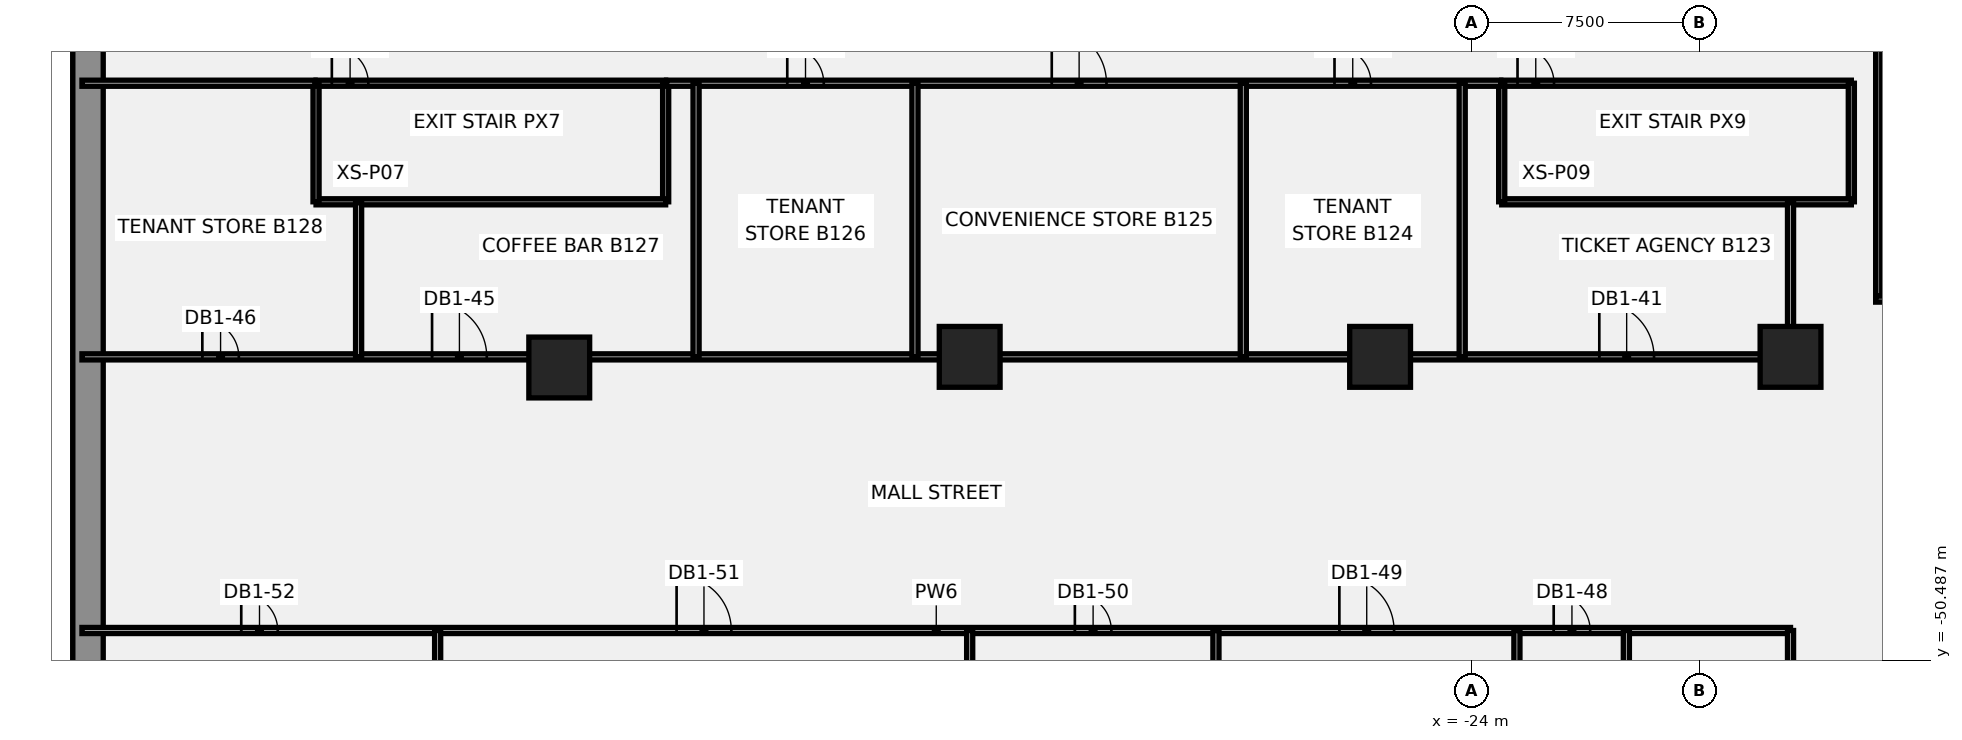
"""IFC4 building model, lengths in metres.
Left out: names, types, materials, properties, quantities, classifications, styles, units other than length and angle.
Written with IfcOpenShell. Run it as: python <this file> out.ifc"""

import sys

from ifc_helpers import new_model, si_unit, direction, frame, frame_2d, origin, origin_2d, place, context, subcontext, project, spatial, rectangle, extrude, element, fill, save


model = new_model("IFC4")
c1 = context("Model", 3, precision=1e-05, world=origin(), true_north=direction((0.0, 1.0)))
c2 = subcontext(c1, "Body", "Model", "MODEL_VIEW")
j1 = project(units=[si_unit("LENGTHUNIT", "METRE"), si_unit("PLANEANGLEUNIT", "RADIAN")], contexts=[c1])
p1 = place(None, origin())
s1 = spatial("IfcSite", under=j1, at=p1, CompositionType="ELEMENT")
p2 = place(p1, origin())
s2 = spatial("IfcBuilding", under=s1, at=p2, CompositionType="ELEMENT")
p3 = place(p2, frame((0.0, 0.0, -7.0)))
s3 = spatial("IfcBuildingStorey", under=s2, at=p3, CompositionType="ELEMENT", Elevation=-7.0)
p4 = place(p3, frame((-69.5, -53.931, -0.45), z_axis=(0.0, 0.0, 1.0), x_axis=(0.0, 1.0, 0.0)))
e1 = element("IfcWall", 1, at=p4, inside=s3, PredefinedType="SOLIDWALL", context=c2, shape_type="SweptSolid", body=[
    extrude(rectangle(XDim=107.863, YDim=1.0, at=frame_2d((53.931, 0.0))), origin(), (0.0, 0.0, 1.0), 6.9),
])
for number, where, z_axis, x_axis in (
    (2, (-54.0, -40.85, -0.45), (0.0, 0.0, 1.0), (1.0, 0.0, 0.0)),
    (3, (-40.5, -40.5, -0.45), (0.0, 0.0, 1.0), (1.0, 0.0, 0.0)),
    (4, (-27.0, -40.5, -0.45), (0.0, 0.0, 1.0), (1.0, 0.0, 0.0)),
    (5, (-13.5, -40.5, -0.45), (0.0, 0.0, 1.0), (1.0, 0.0, 0.0)),
):
    element("IfcColumn", number, at=place(p3, frame(where, z_axis=z_axis, x_axis=x_axis)), inside=s3, PredefinedType="COLUMN", context=c2, shape_type="SweptSolid", body=[
        extrude(rectangle(XDim=2.0, YDim=2.0, at=origin_2d()), origin(), (0.0, 0.0, 1.0), 6.9),
    ])
p5 = place(p3, frame((-62.0, -31.5, 0.0), z_axis=(0.0, 0.0, 1.0), x_axis=(1.0, 0.0, 0.0)))
e6 = element("IfcWall", 6, at=p5, inside=s3, PredefinedType="PARTITIONING", context=c2, shape_type="SweptSolid", body=[
    extrude(rectangle(XDim=11.5, YDim=0.2, at=frame_2d((5.75, 0.0))), origin(), (0.0, 0.0, 1.0), 6.45),
])
p6 = place(p5, frame((0.52, 0.0, 0.0)))
e7 = element("IfcOpeningElement", 7, at=p6, cuts=e6, PredefinedType="OPENING", context=c2, shape_type="SweptSolid", body=[
    extrude(rectangle(XDim=1.2, YDim=2.1, at=frame_2d((0.6, 1.05))), frame((0.0, 0.11, 0.0), z_axis=(0.0, -1.0, 0.0), x_axis=(1.0, 0.0, 0.0)), (0.0, 0.0, 1.0), 0.22),
])
p7 = place(p3, frame((-50.5, -35.4, 0.0), z_axis=(0.0, 0.0, 1.0), x_axis=(0.0, 1.0, 0.0)))
e8 = element("IfcWall", 8, at=p7, inside=s3, PredefinedType="PARTITIONING", context=c2, shape_type="SweptSolid", body=[
    extrude(rectangle(XDim=3.9, YDim=0.2, at=frame_2d((1.95, 0.0))), origin(), (0.0, 0.0, 1.0), 6.45),
])
p8 = place(p3, frame((-62.0, -35.4, 0.0), z_axis=(0.0, 0.0, 1.0), x_axis=(1.0, 0.0, 0.0)))
e9 = element("IfcWall", 9, at=p8, inside=s3, PredefinedType="PARTITIONING", context=c2, shape_type="SweptSolid", body=[
    extrude(rectangle(XDim=11.5, YDim=0.2, at=frame_2d((5.75, 0.0))), origin(), (0.0, 0.0, 1.0), 6.45),
])
p9 = place(p3, frame((-62.0, -35.4, 0.0), z_axis=(0.0, 0.0, 1.0), x_axis=(0.0, 1.0, 0.0)))
e10 = element("IfcWall", 10, at=p9, inside=s3, PredefinedType="PARTITIONING", context=c2, shape_type="SweptSolid", body=[
    extrude(rectangle(XDim=3.9, YDim=0.2, at=frame_2d((1.95, 0.0))), origin(), (0.0, 0.0, 1.0), 6.45),
])
p10 = place(p3, frame((-23.0, -31.5, 0.0), z_axis=(0.0, 0.0, 1.0), x_axis=(1.0, 0.0, 0.0)))
e11 = element("IfcWall", 11, at=p10, inside=s3, PredefinedType="PARTITIONING", context=c2, shape_type="SweptSolid", body=[
    extrude(rectangle(XDim=11.5, YDim=0.2, at=frame_2d((5.75, 0.0))), origin(), (0.0, 0.0, 1.0), 6.45),
])
p11 = place(p10, frame((0.52, 0.0, 0.0)))
e12 = element("IfcOpeningElement", 12, at=p11, cuts=e11, PredefinedType="OPENING", context=c2, shape_type="SweptSolid", body=[
    extrude(rectangle(XDim=1.2, YDim=2.1, at=frame_2d((0.6, 1.05))), frame((0.0, 0.11, 0.0), z_axis=(0.0, -1.0, 0.0), x_axis=(1.0, 0.0, 0.0)), (0.0, 0.0, 1.0), 0.22),
])
p12 = place(p3, frame((-11.5, -35.4, 0.0), z_axis=(0.0, 0.0, 1.0), x_axis=(0.0, 1.0, 0.0)))
e13 = element("IfcWall", 13, at=p12, inside=s3, PredefinedType="PARTITIONING", context=c2, shape_type="SweptSolid", body=[
    extrude(rectangle(XDim=3.9, YDim=0.2, at=frame_2d((1.95, 0.0))), origin(), (0.0, 0.0, 1.0), 6.45),
])
p13 = place(p3, frame((-23.0, -35.4, 0.0), z_axis=(0.0, 0.0, 1.0), x_axis=(1.0, 0.0, 0.0)))
e14 = element("IfcWall", 14, at=p13, inside=s3, PredefinedType="PARTITIONING", context=c2, shape_type="SweptSolid", body=[
    extrude(rectangle(XDim=11.5, YDim=0.2, at=frame_2d((5.75, 0.0))), origin(), (0.0, 0.0, 1.0), 6.45),
])
p14 = place(p3, frame((-23.0, -35.4, 0.0), z_axis=(0.0, 0.0, 1.0), x_axis=(0.0, 1.0, 0.0)))
e15 = element("IfcWall", 15, at=p14, inside=s3, PredefinedType="PARTITIONING", context=c2, shape_type="SweptSolid", body=[
    extrude(rectangle(XDim=3.9, YDim=0.2, at=frame_2d((1.95, 0.0))), origin(), (0.0, 0.0, 1.0), 6.45),
])
p15 = place(p3, frame((-69.699, -49.5, 0.0), z_axis=(0.0, 0.0, 1.0), x_axis=(1.0, 0.0, 0.0)))
e16 = element("IfcWall", 16, at=p15, inside=s3, PredefinedType="PARTITIONING", context=c2, shape_type="SweptSolid", body=[
    extrude(rectangle(XDim=56.199, YDim=0.2, at=frame_2d((28.1, 0.0))), origin(), (0.0, 0.0, 1.0), 6.45),
])
p16 = place(p15, frame((48.409, 0.0, 0.0)))
e17 = element("IfcOpeningElement", 17, at=p16, cuts=e16, PredefinedType="OPENING", context=c2, shape_type="SweptSolid", body=[
    extrude(rectangle(XDim=1.2, YDim=2.1, at=frame_2d((0.6, 1.05))), frame((0.0, 0.11, 0.0), z_axis=(0.0, -1.0, 0.0), x_axis=(1.0, 0.0, 0.0)), (0.0, 0.0, 1.0), 0.22),
])
p17 = place(p15, frame((41.359, 0.0, 0.0)))
e18 = element("IfcOpeningElement", 18, at=p17, cuts=e16, PredefinedType="OPENING", context=c2, shape_type="SweptSolid", body=[
    extrude(rectangle(XDim=1.8, YDim=2.1, at=frame_2d((0.9, 1.05))), frame((0.0, 0.11, 0.0), z_axis=(0.0, -1.0, 0.0), x_axis=(1.0, 0.0, 0.0)), (0.0, 0.0, 1.0), 0.22),
])
p18 = place(p15, frame((32.659, 0.0, 0.0)))
e19 = element("IfcOpeningElement", 19, at=p18, cuts=e16, PredefinedType="OPENING", context=c2, shape_type="SweptSolid", body=[
    extrude(rectangle(XDim=1.2, YDim=2.1, at=frame_2d((0.6, 1.05))), frame((0.0, 0.11, 0.0), z_axis=(0.0, -1.0, 0.0), x_axis=(1.0, 0.0, 0.0)), (0.0, 0.0, 1.0), 0.22),
])
p19 = place(p15, frame((19.559, 0.0, 0.0)))
e20 = element("IfcOpeningElement", 20, at=p19, cuts=e16, PredefinedType="OPENING", context=c2, shape_type="SweptSolid", body=[
    extrude(rectangle(XDim=1.8, YDim=2.1, at=frame_2d((0.9, 1.05))), frame((0.0, 0.11, 0.0), z_axis=(0.0, -1.0, 0.0), x_axis=(1.0, 0.0, 0.0)), (0.0, 0.0, 1.0), 0.22),
])
p20 = place(p15, frame((5.239, 0.0, 0.0)))
e21 = element("IfcOpeningElement", 21, at=p20, cuts=e16, PredefinedType="OPENING", context=c2, shape_type="SweptSolid", body=[
    extrude(rectangle(XDim=1.2, YDim=2.1, at=frame_2d((0.6, 1.05))), frame((0.0, 0.11, 0.0), z_axis=(0.0, -1.0, 0.0), x_axis=(1.0, 0.0, 0.0)), (0.0, 0.0, 1.0), 0.22),
])
p21 = place(p3, frame((-69.699, -40.5, 0.0), z_axis=(0.0, 0.0, 1.0), x_axis=(1.0, 0.0, 0.0)))
e22 = element("IfcWall", 22, at=p21, inside=s3, PredefinedType="PARTITIONING", context=c2, shape_type="SweptSolid", body=[
    extrude(rectangle(XDim=56.199, YDim=0.2, at=frame_2d((28.1, 0.0))), origin(), (0.0, 0.0, 1.0), 6.45),
])
p22 = place(p21, frame((49.909, 0.0, 0.0)))
e23 = element("IfcOpeningElement", 23, at=p22, cuts=e22, PredefinedType="OPENING", context=c2, shape_type="SweptSolid", body=[
    extrude(rectangle(XDim=1.8, YDim=2.1, at=frame_2d((0.9, 1.05))), frame((0.0, 0.11, 0.0), z_axis=(0.0, -1.0, 0.0), x_axis=(1.0, 0.0, 0.0)), (0.0, 0.0, 1.0), 0.22),
])
p23 = place(p21, frame((11.515, 0.0, 0.0)))
e24 = element("IfcOpeningElement", 24, at=p23, cuts=e22, PredefinedType="OPENING", context=c2, shape_type="SweptSolid", body=[
    extrude(rectangle(XDim=1.8, YDim=2.1, at=frame_2d((0.9, 1.05))), frame((0.0, 0.11, 0.0), z_axis=(0.0, -1.0, 0.0), x_axis=(1.0, 0.0, 0.0)), (0.0, 0.0, 1.0), 0.22),
])
p24 = place(p21, frame((3.959, 0.0, 0.0)))
e25 = element("IfcOpeningElement", 25, at=p24, cuts=e22, PredefinedType="OPENING", context=c2, shape_type="SweptSolid", body=[
    extrude(rectangle(XDim=1.2, YDim=2.1, at=frame_2d((0.6, 1.05))), frame((0.0, 0.11, 0.0), z_axis=(0.0, -1.0, 0.0), x_axis=(1.0, 0.0, 0.0)), (0.0, 0.0, 1.0), 0.22),
])
p25 = place(p3, frame((-69.699, -31.5, 0.0), z_axis=(0.0, 0.0, 1.0), x_axis=(1.0, 0.0, 0.0)))
e26 = element("IfcWall", 26, at=p25, inside=s3, PredefinedType="PARTITIONING", context=c2, shape_type="SweptSolid", body=[
    extrude(rectangle(XDim=7.669, YDim=0.2, at=frame_2d((3.834, 0.0))), origin(), (0.0, 0.0, 1.0), 6.45),
])
p26 = place(p3, frame((-60.6, -40.5, 0.0), z_axis=(0.0, 0.0, 1.0), x_axis=(0.0, 1.0, 0.0)))
e27 = element("IfcWall", 27, at=p26, inside=s3, PredefinedType="PARTITIONING", context=c2, shape_type="SweptSolid", body=[
    extrude(rectangle(XDim=5.07, YDim=0.2, at=frame_2d((2.535, 0.0))), origin(), (0.0, 0.0, 1.0), 6.45),
])
p27 = place(p3, frame((-58.0, -59.699, 0.0), z_axis=(0.0, 0.0, 1.0), x_axis=(0.0, 1.0, 0.0)))
e28 = element("IfcWall", 28, at=p27, inside=s3, PredefinedType="PARTITIONING", context=c2, shape_type="SweptSolid", body=[
    extrude(rectangle(XDim=10.199, YDim=0.2, at=frame_2d((5.1, 0.0))), origin(), (0.0, 0.0, 1.0), 6.45),
])
p28 = place(p3, frame((-50.47, -31.5, 0.0), z_axis=(0.0, 0.0, 1.0), x_axis=(1.0, 0.0, 0.0)))
e29 = element("IfcWall", 29, at=p28, inside=s3, PredefinedType="PARTITIONING", context=c2, shape_type="SweptSolid", body=[
    extrude(rectangle(XDim=27.44, YDim=0.2, at=frame_2d((13.72, 0.0))), origin(), (0.0, 0.0, 1.0), 6.45),
])
p29 = place(p28, frame((21.97, 0.0, 0.0)))
e30 = element("IfcOpeningElement", 30, at=p29, cuts=e29, PredefinedType="OPENING", context=c2, shape_type="SweptSolid", body=[
    extrude(rectangle(XDim=1.2, YDim=2.1, at=frame_2d((0.6, 1.05))), frame((0.0, 0.11, 0.0), z_axis=(0.0, -1.0, 0.0), x_axis=(1.0, 0.0, 0.0)), (0.0, 0.0, 1.0), 0.22),
])
p30 = place(p28, frame((12.67, 0.0, 0.0)))
e31 = element("IfcOpeningElement", 31, at=p30, cuts=e29, PredefinedType="OPENING", context=c2, shape_type="SweptSolid", body=[
    extrude(rectangle(XDim=1.8, YDim=2.1, at=frame_2d((0.9, 1.05))), frame((0.0, 0.11, 0.0), z_axis=(0.0, -1.0, 0.0), x_axis=(1.0, 0.0, 0.0)), (0.0, 0.0, 1.0), 0.22),
])
p31 = place(p28, frame((3.97, 0.0, 0.0)))
e32 = element("IfcOpeningElement", 32, at=p31, cuts=e29, PredefinedType="OPENING", context=c2, shape_type="SweptSolid", body=[
    extrude(rectangle(XDim=1.2, YDim=2.1, at=frame_2d((0.6, 1.05))), frame((0.0, 0.11, 0.0), z_axis=(0.0, -1.0, 0.0), x_axis=(1.0, 0.0, 0.0)), (0.0, 0.0, 1.0), 0.22),
])
for number, where, z_axis, x_axis in (
    (33, (-49.5, -40.5, 0.0), (0.0, 0.0, 1.0), (0.0, 1.0, 0.0)),
    (34, (-42.3, -40.5, 0.0), (0.0, 0.0, 1.0), (0.0, 1.0, 0.0)),
):
    element("IfcWall", number, at=place(p3, frame(where, z_axis=z_axis, x_axis=x_axis)), inside=s3, PredefinedType="PARTITIONING", context=c2, shape_type="SweptSolid", body=[
        extrude(rectangle(XDim=9.0, YDim=0.2, at=frame_2d((4.5, 0.0))), origin(), (0.0, 0.0, 1.0), 6.45),
    ])
for number, where, z_axis, x_axis in (
    (35, (-40.5, -59.699, 0.0), (0.0, 0.0, 1.0), (0.0, 1.0, 0.0)),
    (36, (-32.4, -59.699, 0.0), (0.0, 0.0, 1.0), (0.0, 1.0, 0.0)),
):
    element("IfcWall", number, at=place(p3, frame(where, z_axis=z_axis, x_axis=x_axis)), inside=s3, PredefinedType="PARTITIONING", context=c2, shape_type="SweptSolid", body=[
        extrude(rectangle(XDim=10.199, YDim=0.2, at=frame_2d((5.1, 0.0))), origin(), (0.0, 0.0, 1.0), 6.45),
    ])
p32 = place(p3, frame((-31.5, -40.5, 0.0), z_axis=(0.0, 0.0, 1.0), x_axis=(0.0, 1.0, 0.0)))
e37 = element("IfcWall", 37, at=p32, inside=s3, PredefinedType="PARTITIONING", context=c2, shape_type="SweptSolid", body=[
    extrude(rectangle(XDim=9.0, YDim=0.2, at=frame_2d((4.5, 0.0))), origin(), (0.0, 0.0, 1.0), 6.45),
])
p33 = place(p3, frame((-13.5, -40.5, 0.0), z_axis=(0.0, 0.0, 1.0), x_axis=(0.0, 1.0, 0.0)))
e38 = element("IfcWall", 38, at=p33, inside=s3, PredefinedType="PARTITIONING", context=c2, shape_type="SweptSolid", body=[
    extrude(rectangle(XDim=5.07, YDim=0.2, at=frame_2d((2.535, 0.0))), origin(), (0.0, 0.0, 1.0), 6.45),
])
p34 = place(p3, frame((-24.3, -40.5, 0.0), z_axis=(0.0, 0.0, 1.0), x_axis=(0.0, 1.0, 0.0)))
e39 = element("IfcWall", 39, at=p34, inside=s3, PredefinedType="PARTITIONING", context=c2, shape_type="SweptSolid", body=[
    extrude(rectangle(XDim=9.0, YDim=0.2, at=frame_2d((4.5, 0.0))), origin(), (0.0, 0.0, 1.0), 6.45),
])
for number, where, z_axis, x_axis in (
    (40, (-22.5, -59.699, 0.0), (0.0, 0.0, 1.0), (0.0, 1.0, 0.0)),
    (41, (-18.9, -59.699, 0.0), (0.0, 0.0, 1.0), (0.0, 1.0, 0.0)),
):
    element("IfcWall", number, at=place(p3, frame(where, z_axis=z_axis, x_axis=x_axis)), inside=s3, PredefinedType="PARTITIONING", context=c2, shape_type="SweptSolid", body=[
        extrude(rectangle(XDim=10.199, YDim=0.2, at=frame_2d((5.1, 0.0))), origin(), (0.0, 0.0, 1.0), 6.45),
    ])
p35 = place(p3, frame((-13.5, -59.699, 0.0), z_axis=(0.0, 0.0, 1.0), x_axis=(0.0, 1.0, 0.0)))
e42 = element("IfcWall", 42, at=p35, inside=s3, PredefinedType="PARTITIONING", context=c2, shape_type="SweptSolid", body=[
    extrude(rectangle(XDim=10.199, YDim=0.2, at=frame_2d((5.1, 0.0))), origin(), (0.0, 0.0, 1.0), 6.45),
])
p36 = place(p35, frame((2.151, 0.0, 0.0)))
e43 = element("IfcOpeningElement", 43, at=p36, cuts=e42, PredefinedType="OPENING", context=c2, shape_type="SweptSolid", body=[
    extrude(rectangle(XDim=1.8, YDim=2.1, at=frame_2d((0.9, 1.05))), frame((0.0, 0.11, 0.0), z_axis=(0.0, -1.0, 0.0), x_axis=(1.0, 0.0, 0.0)), (0.0, 0.0, 1.0), 0.22),
])
p37 = place(p3, frame((-10.6, -28.8, 0.0), z_axis=(0.0, 0.0, 1.0), x_axis=(0.0, -1.0, 0.0)))
e44 = element("IfcWall", 44, at=p37, inside=s3, PredefinedType="SOLIDWALL", context=c2, shape_type="SweptSolid", body=[
    extrude(rectangle(XDim=9.7, YDim=0.2, at=frame_2d((4.85, 0.0))), origin(), (0.0, 0.0, 1.0), 6.45),
])
p38 = place(p3, frame((-10.7, -38.6, 0.0), z_axis=(0.0, 0.0, 1.0), x_axis=(1.0, 0.0, 0.0)))
e45 = element("IfcWall", 45, at=p38, inside=s3, PredefinedType="SOLIDWALL", context=c2, shape_type="SweptSolid", body=[
    extrude(rectangle(XDim=4.3, YDim=0.2, at=frame_2d((2.15, 0.0))), origin(), (0.0, 0.0, 1.0), 6.45),
])
p39 = place(p6, origin())
e46 = element("IfcDoor", 46, at=p39, inside=s3, OperationType="SINGLE_SWING_LEFT", PredefinedType="DOOR", context=c2, shape_type="SweptSolid", body=[
    extrude(rectangle(XDim=1.2, YDim=2.1, at=frame_2d((0.6, 1.05))), frame((0.0, 0.025, 0.0), z_axis=(0.0, -1.0, 0.0), x_axis=(1.0, 0.0, 0.0)), (0.0, 0.0, 1.0), 0.05),
])
fill(e7, e46)
p40 = place(p11, origin())
e47 = element("IfcDoor", 47, at=p40, inside=s3, OperationType="SINGLE_SWING_LEFT", PredefinedType="DOOR", context=c2, shape_type="SweptSolid", body=[
    extrude(rectangle(XDim=1.2, YDim=2.1, at=frame_2d((0.6, 1.05))), frame((0.0, 0.025, 0.0), z_axis=(0.0, -1.0, 0.0), x_axis=(1.0, 0.0, 0.0)), (0.0, 0.0, 1.0), 0.05),
])
fill(e12, e47)
p41 = place(p22, origin())
e48 = element("IfcDoor", 48, at=p41, inside=s3, OperationType="SINGLE_SWING_LEFT", PredefinedType="DOOR", context=c2, shape_type="SweptSolid", body=[
    extrude(rectangle(XDim=1.8, YDim=2.1, at=frame_2d((0.9, 1.05))), frame((0.0, 0.025, 0.0), z_axis=(0.0, -1.0, 0.0), x_axis=(1.0, 0.0, 0.0)), (0.0, 0.0, 1.0), 0.05),
])
fill(e23, e48)
p42 = place(p29, origin())
e49 = element("IfcDoor", 49, at=p42, inside=s3, OperationType="SINGLE_SWING_RIGHT", PredefinedType="DOOR", context=c2, shape_type="SweptSolid", body=[
    extrude(rectangle(XDim=1.2, YDim=2.1, at=frame_2d((0.6, 1.05))), frame((0.0, 0.025, 0.0), z_axis=(0.0, -1.0, 0.0), x_axis=(1.0, 0.0, 0.0)), (0.0, 0.0, 1.0), 0.05),
])
fill(e30, e49)
p43 = place(p30, origin())
e50 = element("IfcDoor", 50, at=p43, inside=s3, OperationType="SINGLE_SWING_LEFT", PredefinedType="DOOR", context=c2, shape_type="SweptSolid", body=[
    extrude(rectangle(XDim=1.8, YDim=2.1, at=frame_2d((0.9, 1.05))), frame((0.0, 0.025, 0.0), z_axis=(0.0, -1.0, 0.0), x_axis=(1.0, 0.0, 0.0)), (0.0, 0.0, 1.0), 0.05),
])
fill(e31, e50)
p44 = place(p31, origin())
e51 = element("IfcDoor", 51, at=p44, inside=s3, OperationType="SINGLE_SWING_RIGHT", PredefinedType="DOOR", context=c2, shape_type="SweptSolid", body=[
    extrude(rectangle(XDim=1.2, YDim=2.1, at=frame_2d((0.6, 1.05))), frame((0.0, 0.025, 0.0), z_axis=(0.0, -1.0, 0.0), x_axis=(1.0, 0.0, 0.0)), (0.0, 0.0, 1.0), 0.05),
])
fill(e32, e51)
p45 = place(p23, origin())
e52 = element("IfcDoor", 52, at=p45, inside=s3, OperationType="SINGLE_SWING_LEFT", PredefinedType="DOOR", context=c2, shape_type="SweptSolid", body=[
    extrude(rectangle(XDim=1.8, YDim=2.1, at=frame_2d((0.9, 1.05))), frame((0.0, 0.025, 0.0), z_axis=(0.0, -1.0, 0.0), x_axis=(1.0, 0.0, 0.0)), (0.0, 0.0, 1.0), 0.05),
])
fill(e24, e52)
p46 = place(p24, origin())
e53 = element("IfcDoor", 53, at=p46, inside=s3, OperationType="SINGLE_SWING_RIGHT", PredefinedType="DOOR", context=c2, shape_type="SweptSolid", body=[
    extrude(rectangle(XDim=1.2, YDim=2.1, at=frame_2d((0.6, 1.05))), frame((0.0, 0.025, 0.0), z_axis=(0.0, -1.0, 0.0), x_axis=(1.0, 0.0, 0.0)), (0.0, 0.0, 1.0), 0.05),
])
fill(e25, e53)
p47 = place(p16, origin())
e54 = element("IfcDoor", 54, at=p47, inside=s3, OperationType="SINGLE_SWING_RIGHT", PredefinedType="DOOR", context=c2, shape_type="SweptSolid", body=[
    extrude(rectangle(XDim=1.2, YDim=2.1, at=frame_2d((0.6, 1.05))), frame((0.0, 0.025, 0.0), z_axis=(0.0, -1.0, 0.0), x_axis=(1.0, 0.0, 0.0)), (0.0, 0.0, 1.0), 0.05),
])
fill(e17, e54)
p48 = place(p17, origin())
e55 = element("IfcDoor", 55, at=p48, inside=s3, OperationType="SINGLE_SWING_LEFT", PredefinedType="DOOR", context=c2, shape_type="SweptSolid", body=[
    extrude(rectangle(XDim=1.8, YDim=2.1, at=frame_2d((0.9, 1.05))), frame((0.0, 0.025, 0.0), z_axis=(0.0, -1.0, 0.0), x_axis=(1.0, 0.0, 0.0)), (0.0, 0.0, 1.0), 0.05),
])
fill(e18, e55)
p49 = place(p18, origin())
e56 = element("IfcDoor", 56, at=p49, inside=s3, OperationType="SINGLE_SWING_RIGHT", PredefinedType="DOOR", context=c2, shape_type="SweptSolid", body=[
    extrude(rectangle(XDim=1.2, YDim=2.1, at=frame_2d((0.6, 1.05))), frame((0.0, 0.025, 0.0), z_axis=(0.0, -1.0, 0.0), x_axis=(1.0, 0.0, 0.0)), (0.0, 0.0, 1.0), 0.05),
])
fill(e19, e56)
p50 = place(p19, origin())
e57 = element("IfcDoor", 57, at=p50, inside=s3, OperationType="SINGLE_SWING_LEFT", PredefinedType="DOOR", context=c2, shape_type="SweptSolid", body=[
    extrude(rectangle(XDim=1.8, YDim=2.1, at=frame_2d((0.9, 1.05))), frame((0.0, 0.025, 0.0), z_axis=(0.0, -1.0, 0.0), x_axis=(1.0, 0.0, 0.0)), (0.0, 0.0, 1.0), 0.05),
])
fill(e20, e57)
p51 = place(p20, origin())
e58 = element("IfcDoor", 58, at=p51, inside=s3, OperationType="SINGLE_SWING_RIGHT", PredefinedType="DOOR", context=c2, shape_type="SweptSolid", body=[
    extrude(rectangle(XDim=1.2, YDim=2.1, at=frame_2d((0.6, 1.05))), frame((0.0, 0.025, 0.0), z_axis=(0.0, -1.0, 0.0), x_axis=(1.0, 0.0, 0.0)), (0.0, 0.0, 1.0), 0.05),
])
fill(e21, e58)
save(model, sys.argv[1])
